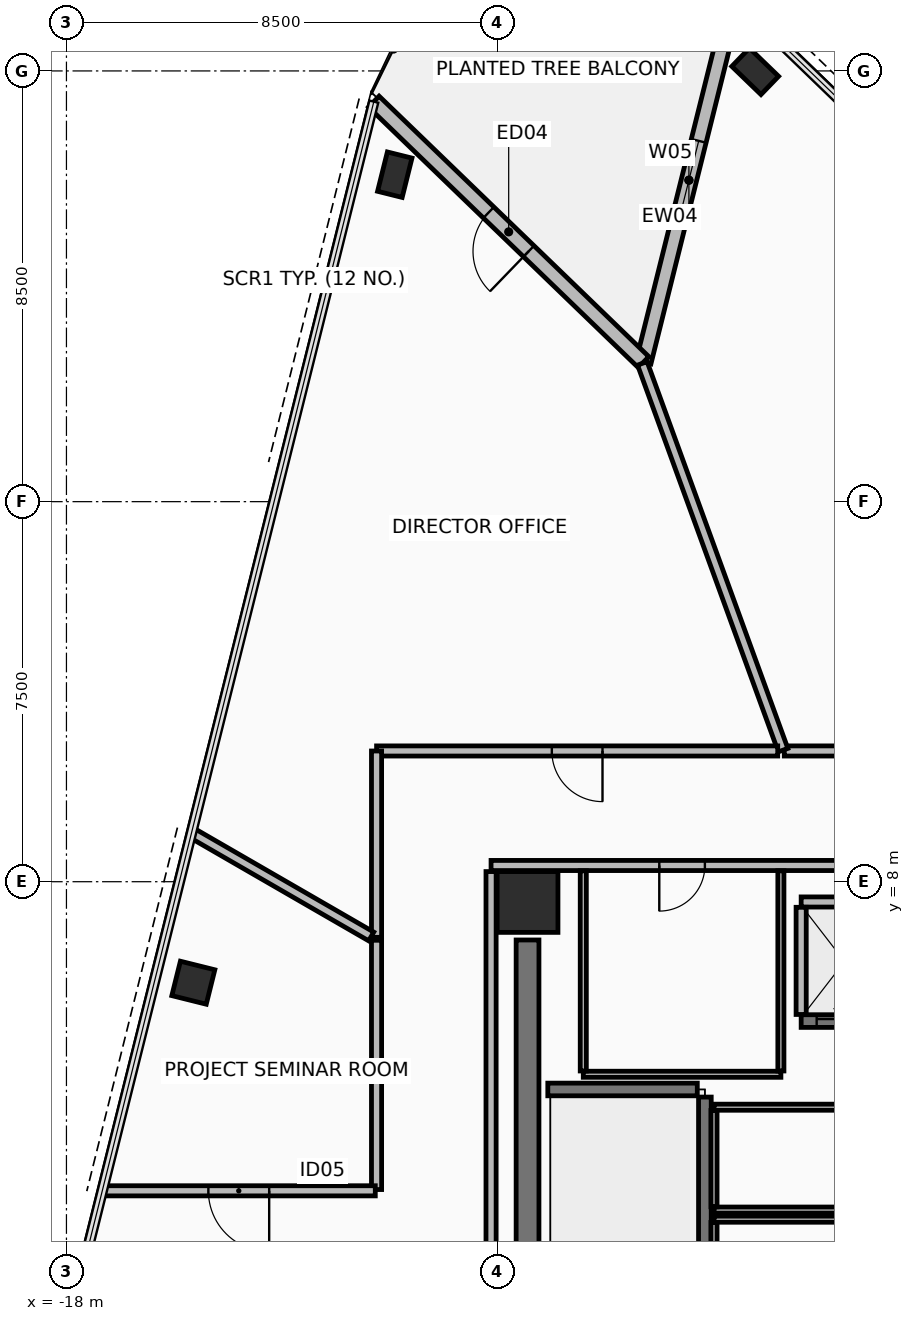
"""IFC4 building model, lengths in metres.
Left out: names, types, materials, properties, quantities, classifications, styles, units other than length and angle.
Written with IfcOpenShell. Run it as: python <this file> out.ifc"""

import sys

from ifc_helpers import new_model, si_unit, direction, frame, frame_2d, origin, origin_2d, place, context, subcontext, project, spatial, rectangle, hollow_rectangle, extrude, element, fill, save


model = new_model("IFC4")
c1 = context("Model", 3, precision=1e-05, world=origin(), true_north=direction((0.0, 1.0)))
c2 = subcontext(c1, "Body", "Model", "MODEL_VIEW")
j1 = project(units=[si_unit("LENGTHUNIT", "METRE"), si_unit("PLANEANGLEUNIT", "RADIAN")], contexts=[c1])
p1 = place(None, origin())
s1 = spatial("IfcSite", under=j1, at=p1, CompositionType="ELEMENT")
p2 = place(p1, origin())
s2 = spatial("IfcBuilding", under=s1, at=p2, CompositionType="ELEMENT")
p3 = place(p2, frame((0.0, 0.0, 89.7)))
s3 = spatial("IfcBuildingStorey", under=s2, at=p3, CompositionType="ELEMENT", Elevation=89.7)
p4 = place(p3, frame((-8.9, 7.6, 0.0), z_axis=(0.0, 0.0, 1.0), x_axis=(1.0, 0.0, 0.0)))
e1 = element("IfcColumn", 1, at=p4, inside=s3, PredefinedType="COLUMN", context=c2, shape_type="SweptSolid", body=[
    extrude(rectangle(XDim=1.2, YDim=1.2, at=origin_2d()), origin(), (0.0, 0.0, 1.0), 3.6),
])
p5 = place(p3, frame((-11.52, 21.952, 0.0), z_axis=(0.0, 0.0, 1.0), x_axis=(0.2419218956, 0.970295726276, 0.0)))
e2 = element("IfcColumn", 2, at=p5, inside=s3, PredefinedType="COLUMN", context=c2, shape_type="SweptSolid", body=[
    extrude(hollow_rectangle(XDim=0.5, YDim=0.8, WallThickness=0.04, at=origin_2d()), origin(), (0.0, 0.0, 1.0), 3.6),
])
p6 = place(p3, frame((-15.496, 6.007, 0.0), z_axis=(0.0, 0.0, 1.0), x_axis=(0.2419218956, 0.970295726276, 0.0)))
e3 = element("IfcColumn", 3, at=p6, inside=s3, PredefinedType="COLUMN", context=c2, shape_type="SweptSolid", body=[
    extrude(hollow_rectangle(XDim=0.7, YDim=0.7, WallThickness=0.04, at=origin_2d()), origin(), (0.0, 0.0, 1.0), 3.6),
])
p7 = place(p3, frame((-4.407, 23.992, 0.0), z_axis=(0.0, 0.0, 1.0), x_axis=(-0.719339800339, 0.694658370459, 0.0)))
e4 = element("IfcColumn", 4, at=p7, inside=s3, PredefinedType="COLUMN", context=c2, shape_type="SweptSolid", body=[
    extrude(hollow_rectangle(XDim=0.5, YDim=0.8, WallThickness=0.04, at=origin_2d()), origin(), (0.0, 0.0, 1.0), 3.6),
])
p8 = place(p3, frame((-4.82, 25.434, 0.0), z_axis=(0.0, 0.0, 1.0), x_axis=(-0.241930078207, -0.970293686086, 0.0)))
e5 = element("IfcWall", 5, at=p8, inside=s3, PredefinedType="STANDARD", context=c2, shape_type="SweptSolid", body=[
    extrude(rectangle(XDim=7.4, YDim=0.3, at=frame_2d((3.7, 0.0))), origin(), (0.0, 0.0, 1.0), 2.605),
])
p9 = place(p8, frame((2.9, 0.0, 0.25)))
e6 = element("IfcOpeningElement", 6, at=p9, cuts=e5, PredefinedType="OPENING", context=c2, shape_type="SweptSolid", body=[
    extrude(rectangle(XDim=1.6, YDim=2.2, at=frame_2d((0.8, 1.1))), frame((0.0, 0.16, 0.0), z_axis=(0.0, -1.0, 0.0), x_axis=(1.0, 0.0, 0.0)), (0.0, 0.0, 1.0), 0.32),
])
p10 = place(p3, frame((-6.611, 18.254, 0.0), z_axis=(0.0, 0.0, 1.0), x_axis=(-0.719321869339, 0.694676938073, 0.0)))
e7 = element("IfcWall", 7, at=p10, inside=s3, PredefinedType="STANDARD", context=c2, shape_type="SweptSolid", body=[
    extrude(rectangle(XDim=7.4, YDim=0.3, at=frame_2d((3.7, 0.0))), origin(), (0.0, 0.0, 1.0), 2.605),
])
p11 = place(p10, frame((3.15, 0.0, 0.0)))
e8 = element("IfcOpeningElement", 8, at=p11, cuts=e7, PredefinedType="OPENING", context=c2, shape_type="SweptSolid", body=[
    extrude(rectangle(XDim=1.1, YDim=2.2, at=frame_2d((0.55, 1.1))), frame((0.0, 0.16, 0.0), z_axis=(0.0, -1.0, 0.0), x_axis=(1.0, 0.0, 0.0)), (0.0, 0.0, 1.0), 0.32),
])
p12 = place(p3, frame((-8.9, -3.85, 0.0), z_axis=(0.0, 0.0, 1.0), x_axis=(0.0, 1.0, 0.0)))
e9 = element("IfcWall", 9, at=p12, inside=s3, PredefinedType="SHEAR", context=c2, shape_type="SweptSolid", body=[
    extrude(rectangle(XDim=10.7, YDim=0.45, at=frame_2d((5.35, 0.0))), origin(), (0.0, 0.0, 1.0), 3.41),
])
p13 = place(p3, frame((9.62, 8.32, 0.0), z_axis=(0.0, 0.0, 1.0), x_axis=(-1.0, 0.0, 0.0)))
e10 = element("IfcWall", 10, at=p13, inside=s3, PredefinedType="PARTITIONING", context=c2, shape_type="SweptSolid", body=[
    extrude(rectangle(XDim=19.24, YDim=0.2, at=frame_2d((9.62, 0.0))), origin(), (0.0, 0.0, 1.0), 2.755),
])
p14 = place(p13, frame((15.02, 0.0, 0.0)))
e11 = element("IfcOpeningElement", 11, at=p14, cuts=e10, PredefinedType="OPENING", context=c2, shape_type="SweptSolid", body=[
    extrude(rectangle(XDim=0.9, YDim=2.1, at=frame_2d((0.45, 1.05))), frame((0.0, 0.11, 0.0), z_axis=(0.0, -1.0, 0.0), x_axis=(1.0, 0.0, 0.0)), (0.0, 0.0, 1.0), 0.22),
])
p15 = place(p3, frame((-9.62, 8.2, 0.0), z_axis=(0.0, 0.0, 1.0), x_axis=(0.0, -1.0, 0.0)))
e12 = element("IfcWall", 12, at=p15, inside=s3, PredefinedType="PARTITIONING", context=c2, shape_type="SweptSolid", body=[
    extrude(rectangle(XDim=16.4, YDim=0.2, at=frame_2d((8.2, 0.0))), origin(), (0.0, 0.0, 1.0), 2.805),
])
p16 = place(p15, frame((12.65, 0.0, 0.0)))
e13 = element("IfcOpeningElement", 13, at=p16, cuts=e12, PredefinedType="OPENING", context=c2, shape_type="SweptSolid", body=[
    extrude(rectangle(XDim=1.1, YDim=2.15, at=frame_2d((0.55, 1.075))), frame((0.0, 0.11, 0.0), z_axis=(0.0, -1.0, 0.0), x_axis=(1.0, 0.0, 0.0)), (0.0, 0.0, 1.0), 0.22),
])
p17 = place(p3, frame((-5.4, -3.55, 0.0), z_axis=(0.0, 0.0, 1.0), x_axis=(0.0, 1.0, 0.0)))
e14 = element("IfcWall", 14, at=p17, inside=s3, PredefinedType="SHEAR", context=c2, shape_type="SweptSolid", body=[
    extrude(rectangle(XDim=7.3, YDim=0.25, at=frame_2d((3.65, 0.0))), origin(), (0.0, 0.0, 1.0), 3.41),
])
p18 = place(p3, frame((-8.5, 3.9, 0.0), z_axis=(0.0, 0.0, 1.0), x_axis=(1.0, 0.0, 0.0)))
e15 = element("IfcWall", 15, at=p18, inside=s3, PredefinedType="SHEAR", context=c2, shape_type="SweptSolid", body=[
    extrude(rectangle(XDim=2.95, YDim=0.25, at=frame_2d((1.475, 0.0))), origin(), (0.0, 0.0, 1.0), 3.41),
])
p19 = place(p3, frame((-3.5, 5.25, 0.0), z_axis=(0.0, 0.0, 1.0), x_axis=(1.0, 0.0, 0.0)))
e16 = element("IfcWall", 16, at=p19, inside=s3, PredefinedType="SHEAR", context=c2, shape_type="SweptSolid", body=[
    extrude(rectangle(XDim=1.712, YDim=0.25, at=frame_2d((0.856, 0.0))), origin(), (0.0, 0.0, 1.0), 3.41),
])
p20 = place(p19, frame((0.306, 0.0, 0.0)))
e17 = element("IfcOpeningElement", 17, at=p20, cuts=e16, PredefinedType="OPENING", context=c2, shape_type="SweptSolid", body=[
    extrude(rectangle(XDim=1.1, YDim=2.2, at=frame_2d((0.55, 1.1))), frame((0.0, 0.135, 0.0), z_axis=(0.0, -1.0, 0.0), x_axis=(1.0, 0.0, 0.0)), (0.0, 0.0, 1.0), 0.27),
])
p21 = place(p3, frame((-3.5, 7.6, 0.0), z_axis=(0.0, 0.0, 1.0), x_axis=(1.0, 0.0, 0.0)))
e18 = element("IfcWall", 18, at=p21, inside=s3, PredefinedType="PARTITIONING", context=c2, shape_type="SweptSolid", body=[
    extrude(rectangle(XDim=0.7, YDim=0.2, at=frame_2d((0.35, 0.0))), origin(), (0.0, 0.0, 1.0), 2.605),
])
p22 = place(p3, frame((-3.5, 5.38, 0.0), z_axis=(0.0, 0.0, 1.0), x_axis=(0.0, 1.0, 0.0)))
e19 = element("IfcWall", 19, at=p22, inside=s3, PredefinedType="PARTITIONING", context=c2, shape_type="SweptSolid", body=[
    extrude(rectangle(XDim=2.115, YDim=0.2, at=frame_2d((1.058, 0.0))), origin(), (0.0, 0.0, 1.0), 2.605),
])
p23 = place(p3, frame((-5.22, 1.52, 0.0), z_axis=(0.0, 0.0, 1.0), x_axis=(1.0, 0.0, 0.0)))
e20 = element("IfcWall", 20, at=p23, inside=s3, PredefinedType="PARTITIONING", context=c2, shape_type="SweptSolid", body=[
    extrude(rectangle(XDim=3.47, YDim=0.12, at=frame_2d((1.735, 0.0))), origin(), (0.0, 0.0, 1.0), 3.41),
])
p24 = place(p3, frame((-1.815, 3.55, 0.0), z_axis=(0.0, 0.0, 1.0), x_axis=(-1.0, 0.0, 0.0)))
e21 = element("IfcWall", 21, at=p24, inside=s3, PredefinedType="PARTITIONING", context=c2, shape_type="SweptSolid", body=[
    extrude(rectangle(XDim=3.405, YDim=0.12, at=frame_2d((1.703, 0.0))), origin(), (0.0, 0.0, 1.0), 3.41),
])
p25 = place(p3, frame((-5.22, 3.485, 0.0), z_axis=(0.0, 0.0, 1.0), x_axis=(0.0, -1.0, 0.0)))
e22 = element("IfcWall", 22, at=p25, inside=s3, PredefinedType="PARTITIONING", context=c2, shape_type="SweptSolid", body=[
    extrude(rectangle(XDim=1.9, YDim=0.12, at=frame_2d((0.95, 0.0))), origin(), (0.0, 0.0, 1.0), 3.41),
])
p26 = place(p3, frame((-1.815, 1.34, 0.0), z_axis=(0.0, 0.0, 1.0), x_axis=(-1.0, 0.0, 0.0)))
e23 = element("IfcWall", 23, at=p26, inside=s3, PredefinedType="PARTITIONING", context=c2, shape_type="SweptSolid", body=[
    extrude(rectangle(XDim=3.405, YDim=0.12, at=frame_2d((1.703, 0.0))), origin(), (0.0, 0.0, 1.0), 3.41),
])
p27 = place(p3, frame((-5.22, 1.275, 0.0), z_axis=(0.0, 0.0, 1.0), x_axis=(0.0, -1.0, 0.0)))
e24 = element("IfcWall", 24, at=p27, inside=s3, PredefinedType="PARTITIONING", context=c2, shape_type="SweptSolid", body=[
    extrude(rectangle(XDim=1.76, YDim=0.12, at=frame_2d((0.88, 0.0))), origin(), (0.0, 0.0, 1.0), 3.41),
])
p28 = place(p3, frame((-7.8, 4.2, 0.0), z_axis=(0.0, 0.0, 1.0), x_axis=(1.0, 0.0, 0.0)))
e25 = element("IfcWall", 25, at=p28, inside=s3, PredefinedType="PARTITIONING", context=c2, shape_type="SweptSolid", body=[
    extrude(rectangle(XDim=3.9, YDim=0.12, at=frame_2d((1.95, 0.0))), origin(), (0.0, 0.0, 1.0), 3.41),
])
for number, where, z_axis, x_axis in (
    (26, (-3.9, 4.265, 0.0), (0.0, 0.0, 1.0), (0.0, 1.0, 0.0)),
    (27, (-7.8, 8.215, 0.0), (0.0, 0.0, 1.0), (0.0, -1.0, 0.0)),
):
    element("IfcWall", number, at=place(p3, frame(where, z_axis=z_axis, x_axis=x_axis)), inside=s3, PredefinedType="PARTITIONING", context=c2, shape_type="SweptSolid", body=[
        extrude(rectangle(XDim=3.95, YDim=0.12, at=frame_2d((1.975, 0.0))), origin(), (0.0, 0.0, 1.0), 2.605),
    ])
p29 = place(p3, frame((-2.025, 10.58, 0.0), z_axis=(0.0, 0.0, 1.0), x_axis=(-1.0, 0.0, 0.0)))
e28 = element("IfcWall", 28, at=p29, inside=s3, PredefinedType="PARTITIONING", context=c2, shape_type="SweptSolid", body=[
    extrude(rectangle(XDim=1.808, YDim=0.2, at=frame_2d((0.904, 0.0))), origin(), (0.0, 0.0, 1.0), 3.41),
])
p30 = place(p3, frame((-3.857, 10.596, 0.0), z_axis=(0.0, 0.0, 1.0), x_axis=(-0.342035074279, 0.939687186229, 0.0)))
e29 = element("IfcWall", 29, at=p30, inside=s3, PredefinedType="PARTITIONING", context=c2, shape_type="SweptSolid", body=[
    extrude(rectangle(XDim=8.122, YDim=0.2, at=frame_2d((4.061, 0.0))), origin(), (0.0, 0.0, 1.0), 2.805),
])
p31 = place(p3, frame((-3.963, 10.58, 0.0), z_axis=(0.0, 0.0, 1.0), x_axis=(-1.0, 0.0, 0.0)))
e30 = element("IfcWall", 30, at=p31, inside=s3, PredefinedType="PARTITIONING", context=c2, shape_type="SweptSolid", body=[
    extrude(rectangle(XDim=7.917, YDim=0.2, at=frame_2d((3.958, 0.0))), origin(), (0.0, 0.0, 1.0), 2.755),
])
p32 = place(p31, frame((3.458, 0.0, 0.0)))
e31 = element("IfcOpeningElement", 31, at=p32, cuts=e30, PredefinedType="OPENING", context=c2, shape_type="SweptSolid", body=[
    extrude(rectangle(XDim=1.0, YDim=2.15, at=frame_2d((0.5, 1.075))), frame((0.0, 0.11, 0.0), z_axis=(0.0, -1.0, 0.0), x_axis=(1.0, 0.0, 0.0)), (0.0, 0.0, 1.0), 0.22),
])
p33 = place(p3, frame((-11.88, 10.579, 0.0), z_axis=(0.0, 0.0, 1.0), x_axis=(0.0, -1.0, 0.0)))
e32 = element("IfcWall", 32, at=p33, inside=s3, PredefinedType="PARTITIONING", context=c2, shape_type="SweptSolid", body=[
    extrude(rectangle(XDim=3.677, YDim=0.2, at=frame_2d((1.839, 0.0))), origin(), (0.0, 0.0, 1.0), 2.805),
])
p34 = place(p3, frame((-11.985, 6.92, 0.0), z_axis=(0.0, 0.0, 1.0), x_axis=(-0.866029956157, 0.499992114976, 0.0)))
e33 = element("IfcWall", 33, at=p34, inside=s3, PredefinedType="PARTITIONING", context=c2, shape_type="SweptSolid", body=[
    extrude(rectangle(XDim=4.075, YDim=0.2, at=frame_2d((2.038, 0.0))), origin(), (0.0, 0.0, 1.0), 2.605),
])
p35 = place(p3, frame((-11.88, 6.844, 0.0), z_axis=(0.0, 0.0, 1.0), x_axis=(0.0, -1.0, 0.0)))
e34 = element("IfcWall", 34, at=p35, inside=s3, PredefinedType="PARTITIONING", context=c2, shape_type="SweptSolid", body=[
    extrude(rectangle(XDim=4.919, YDim=0.2, at=frame_2d((2.46, 0.0))), origin(), (0.0, 0.0, 1.0), 2.805),
])
p36 = place(p3, frame((-11.905, 1.9, 0.0), z_axis=(0.0, 0.0, 1.0), x_axis=(-1.0, 0.0, 0.0)))
e35 = element("IfcWall", 35, at=p36, inside=s3, PredefinedType="PARTITIONING", context=c2, shape_type="SweptSolid", body=[
    extrude(rectangle(XDim=5.388, YDim=0.2, at=frame_2d((2.694, 0.0))), origin(), (0.0, 0.0, 1.0), 2.605),
])
p37 = place(p36, frame((2.094, 0.0, 0.0)))
e36 = element("IfcOpeningElement", 36, at=p37, cuts=e35, PredefinedType="OPENING", context=c2, shape_type="SweptSolid", body=[
    extrude(rectangle(XDim=1.2, YDim=2.15, at=frame_2d((0.6, 1.075))), frame((0.0, 0.11, 0.0), z_axis=(0.0, -1.0, 0.0), x_axis=(1.0, 0.0, 0.0)), (0.0, 0.0, 1.0), 0.22),
])
p38 = place(p11, origin())
e37 = element("IfcDoor", 37, at=p38, inside=s3, OperationType="SINGLE_SWING_LEFT", PredefinedType="DOOR", context=c2, shape_type="SweptSolid", body=[
    extrude(rectangle(XDim=1.1, YDim=2.2, at=frame_2d((0.55, 1.1))), frame((0.0, 0.025, 0.0), z_axis=(0.0, -1.0, 0.0), x_axis=(1.0, 0.0, 0.0)), (0.0, 0.0, 1.0), 0.05),
])
fill(e8, e37)
p39 = place(p9, origin())
e38 = element("IfcWindow", 38, at=p39, inside=s3, PartitioningType="SINGLE_PANEL", PredefinedType="WINDOW", context=c2, shape_type="SweptSolid", body=[
    extrude(rectangle(XDim=1.6, YDim=2.2, at=frame_2d((0.8, 1.1))), frame((0.0, 0.03, 0.0), z_axis=(0.0, -1.0, 0.0), x_axis=(1.0, 0.0, 0.0)), (0.0, 0.0, 1.0), 0.06),
])
fill(e6, e38)
p40 = place(p20, origin())
e39 = element("IfcDoor", 39, at=p40, inside=s3, OperationType="SLIDING_TO_LEFT", PredefinedType="DOOR", context=c2, shape_type="SweptSolid", body=[
    extrude(rectangle(XDim=1.1, YDim=2.2, at=frame_2d((0.55, 1.1))), frame((0.0, 0.025, 0.0), z_axis=(0.0, -1.0, 0.0), x_axis=(1.0, 0.0, 0.0)), (0.0, 0.0, 1.0), 0.05),
])
fill(e17, e39)
p41 = place(p14, frame((0.9, 0.0, 0.0), z_axis=(0.0, 0.0, 1.0), x_axis=(-1.0, 0.0, 0.0)))
e40 = element("IfcDoor", 40, at=p41, inside=s3, OperationType="SINGLE_SWING_LEFT", PredefinedType="DOOR", context=c2, shape_type="SweptSolid", body=[
    extrude(rectangle(XDim=0.9, YDim=2.1, at=frame_2d((0.45, 1.05))), frame((0.0, 0.025, 0.0), z_axis=(0.0, -1.0, 0.0), x_axis=(1.0, 0.0, 0.0)), (0.0, 0.0, 1.0), 0.05),
])
fill(e11, e40)
p42 = place(p32, origin())
e41 = element("IfcDoor", 41, at=p42, inside=s3, OperationType="SINGLE_SWING_RIGHT", PredefinedType="DOOR", context=c2, shape_type="SweptSolid", body=[
    extrude(rectangle(XDim=1.0, YDim=2.15, at=frame_2d((0.5, 1.075))), frame((0.0, 0.025, 0.0), z_axis=(0.0, -1.0, 0.0), x_axis=(1.0, 0.0, 0.0)), (0.0, 0.0, 1.0), 0.05),
])
fill(e31, e41)
p43 = place(p37, origin())
e42 = element("IfcDoor", 42, at=p43, inside=s3, OperationType="SINGLE_SWING_LEFT", PredefinedType="DOOR", context=c2, shape_type="SweptSolid", body=[
    extrude(rectangle(XDim=1.2, YDim=2.15, at=frame_2d((0.6, 1.075))), frame((0.0, 0.025, 0.0), z_axis=(0.0, -1.0, 0.0), x_axis=(1.0, 0.0, 0.0)), (0.0, 0.0, 1.0), 0.05),
])
fill(e36, e42)
save(model, sys.argv[1])
